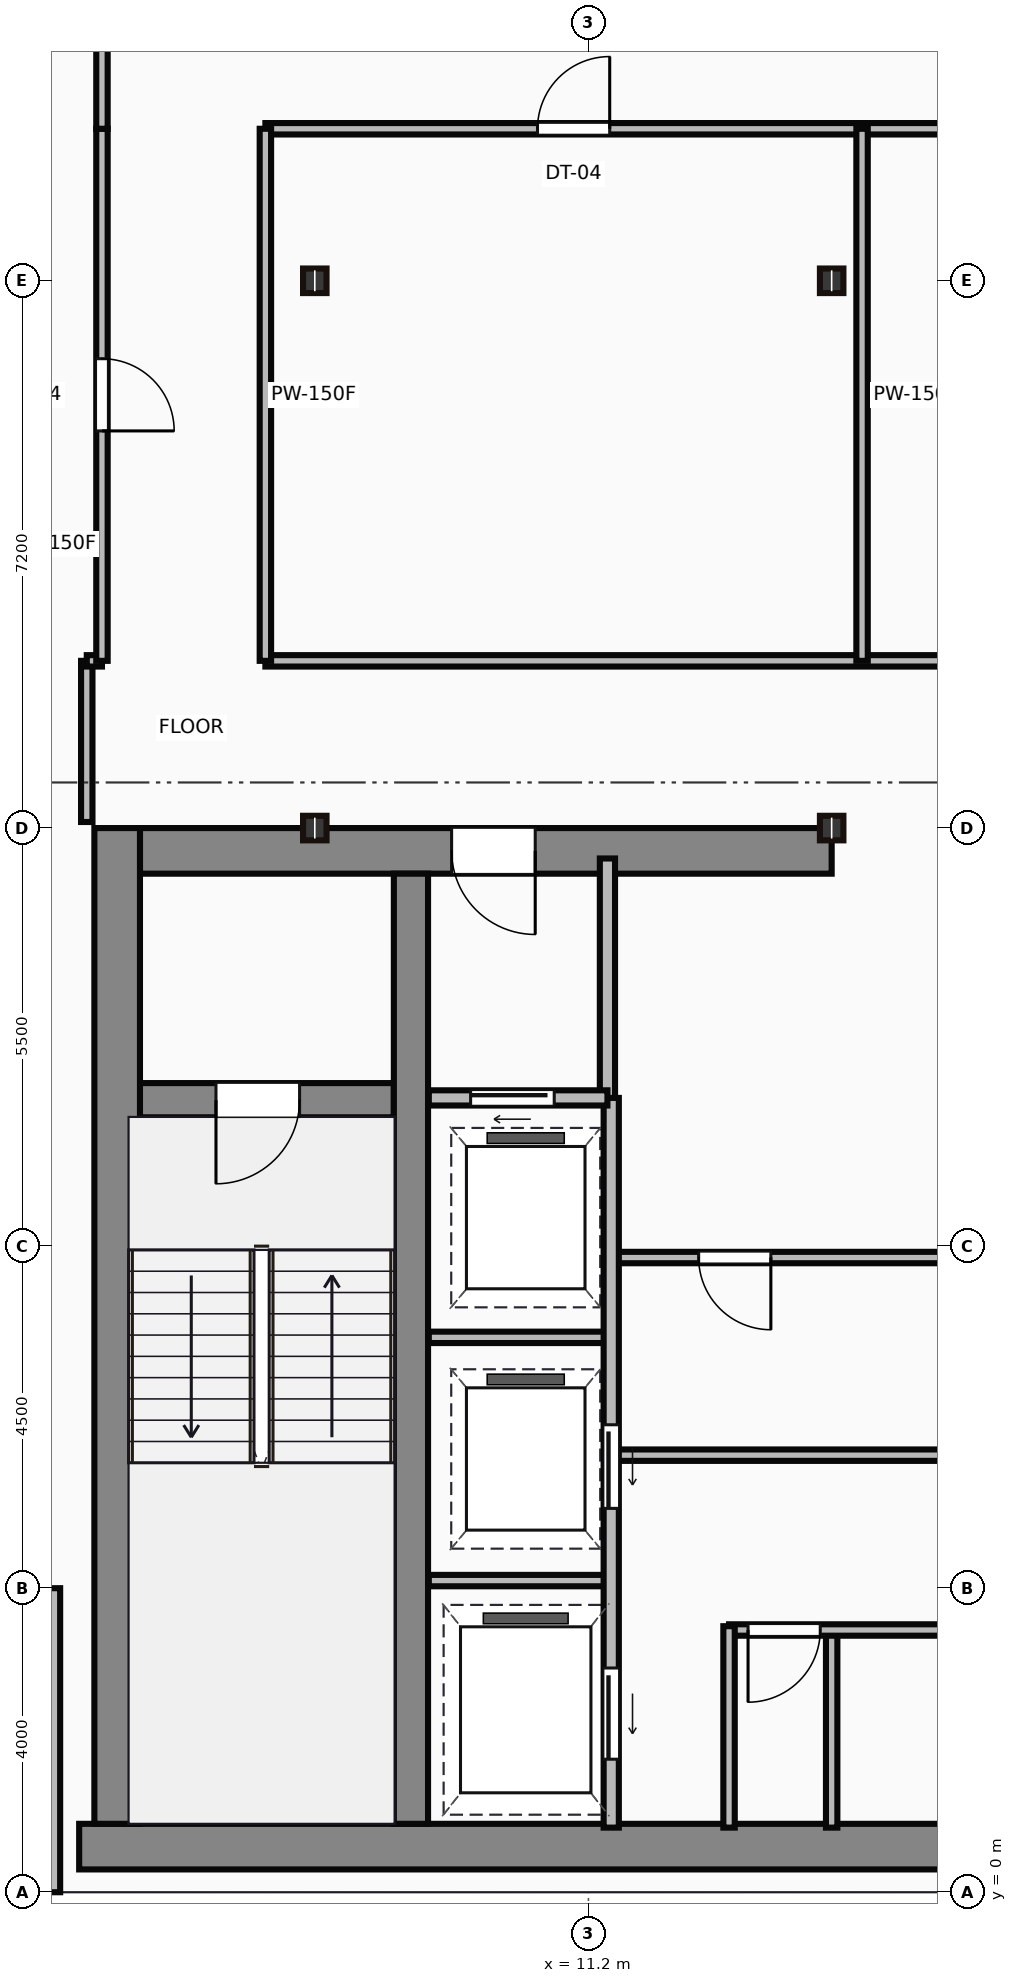
"""IFC4 building model, lengths in metres.
Left out: names, types, materials, properties, quantities, classifications, styles, units other than length and angle.
Written with IfcOpenShell. Run it as: python <this file> out.ifc"""

import sys

from ifc_helpers import new_model, si_unit, direction, frame, frame_2d, origin, origin_2d, place, context, subcontext, project, spatial, rectangle, i_section, extrude, source, transform, mapped, element, fill, save


model = new_model("IFC4")
c1 = context("Model", 3, precision=1e-05, world=origin(), true_north=direction((0.0, 1.0)))
c2 = subcontext(c1, "Body", "Model", "MODEL_VIEW")
j1 = project(units=[si_unit("LENGTHUNIT", "METRE"), si_unit("PLANEANGLEUNIT", "RADIAN")], contexts=[c1])
p1 = place(None, origin())
s1 = spatial("IfcSite", under=j1, at=p1, CompositionType="ELEMENT")
p2 = place(p1, origin())
s2 = spatial("IfcBuilding", under=s1, at=p2, CompositionType="ELEMENT")
p3 = place(p2, frame((0.0, 0.0, 273.4)))
s3 = spatial("IfcBuildingStorey", under=s2, at=p3, CompositionType="ELEMENT", Elevation=273.4)
m1 = source(origin(), c2, "Body", "SweptSolid", [
    extrude(rectangle(XDim=29.5, YDim=0.6, at=frame_2d((14.75, 0.0))), origin(), (0.0, 0.0, 1.0), 3.65),
])
p4 = place(p3, frame((4.5, 0.6, 0.0), z_axis=(0.0, 0.0, 1.0), x_axis=(1.0, 0.0, 0.0)))
e1 = element("IfcWall", 1, at=p4, inside=s3, PredefinedType="SHEAR", context=c2, shape_type="MappedRepresentation", body=[
    mapped(m1, transform((0.0, 0.0, 0.0))),
])
m2 = source(origin(), c2, "Body", "SweptSolid", [
    extrude(rectangle(XDim=13.1, YDim=0.6, at=frame_2d((6.55, 0.0))), origin(), (0.0, 0.0, 1.0), 3.65),
])
p5 = place(p3, frame((5.0, 0.9, 0.0), z_axis=(0.0, 0.0, 1.0), x_axis=(0.0, 1.0, 0.0)))
e2 = element("IfcWall", 2, at=p5, inside=s3, PredefinedType="SHEAR", context=c2, shape_type="MappedRepresentation", body=[
    mapped(m2, transform((0.0, 0.0, 0.0))),
])
m3 = source(origin(), c2, "Body", "SweptSolid", [
    extrude(rectangle(XDim=9.1, YDim=0.6, at=frame_2d((4.55, 0.0))), origin(), (0.0, 0.0, 1.0), 3.65),
])
p6 = place(p3, frame((5.3, 13.7, 0.0), z_axis=(0.0, 0.0, 1.0), x_axis=(1.0, 0.0, 0.0)))
e3 = element("IfcWall", 3, at=p6, inside=s3, PredefinedType="SHEAR", context=c2, shape_type="MappedRepresentation", body=[
    mapped(m3, transform((0.0, 0.0, 0.0))),
])
p7 = place(p6, frame((4.1, 0.0, 0.0)))
e4 = element("IfcOpeningElement", 4, at=p7, cuts=e3, PredefinedType="OPENING", context=c2, shape_type="SweptSolid", body=[
    extrude(rectangle(XDim=1.1, YDim=2.15, at=frame_2d((0.55, 1.075))), frame((0.0, 0.31, 0.0), z_axis=(0.0, -1.0, 0.0), x_axis=(1.0, 0.0, 0.0)), (0.0, 0.0, 1.0), 0.62),
])
m4 = source(origin(), c2, "Body", "SweptSolid", [
    extrude(rectangle(XDim=12.5, YDim=0.45, at=frame_2d((6.25, 0.0))), origin(), (0.0, 0.0, 1.0), 3.65),
])
p8 = place(p3, frame((8.865, 0.9, 0.0), z_axis=(0.0, 0.0, 1.0), x_axis=(0.0, 1.0, 0.0)))
e5 = element("IfcWall", 5, at=p8, inside=s3, PredefinedType="SHEAR", context=c2, shape_type="MappedRepresentation", body=[
    mapped(m4, transform((0.0, 0.0, 0.0))),
])
m5 = source(origin(), c2, "Body", "SweptSolid", [
    extrude(rectangle(XDim=3.39, YDim=0.45, at=frame_2d((1.695, 0.0))), origin(), (0.0, 0.0, 1.0), 3.65),
])
p9 = place(p3, frame((5.25, 10.42, 0.0), z_axis=(0.0, 0.0, 1.0), x_axis=(1.0, 0.0, 0.0)))
e6 = element("IfcWall", 6, at=p9, inside=s3, PredefinedType="SHEAR", context=c2, shape_type="MappedRepresentation", body=[
    mapped(m5, transform((0.0, 0.0, 0.0))),
])
p10 = place(p9, frame((1.05, 0.0, 0.0)))
e7 = element("IfcOpeningElement", 7, at=p10, cuts=e6, PredefinedType="OPENING", context=c2, shape_type="SweptSolid", body=[
    extrude(rectangle(XDim=1.1, YDim=2.15, at=frame_2d((0.55, 1.075))), frame((0.0, 0.235, 0.0), z_axis=(0.0, -1.0, 0.0), x_axis=(1.0, 0.0, 0.0)), (0.0, 0.0, 1.0), 0.47),
])
m6 = source(origin(), c2, "Body", "SweptSolid", [
    extrude(i_section(OverallWidth=0.309, OverallDepth=0.323, WebThickness=0.014, FlangeThickness=0.023, at=origin_2d()), origin(), (0.0, 0.0, 1.0), 3.65),
])
for number, where, z_axis, x_axis in (
    (8, (7.6, 14.0, 0.0), (0.0, 0.0, 1.0), (1.0, 0.0, 0.0)),
    (9, (7.6, 21.2, 0.0), (0.0, 0.0, 1.0), (1.0, 0.0, 0.0)),
    (10, (14.4, 14.0, 0.0), (0.0, 0.0, 1.0), (1.0, 0.0, 0.0)),
    (11, (14.4, 21.2, 0.0), (0.0, 0.0, 1.0), (1.0, 0.0, 0.0)),
):
    element("IfcColumn", number, at=place(p3, frame(where, z_axis=z_axis, x_axis=x_axis)), inside=s3, PredefinedType="COLUMN", context=c2, shape_type="MappedRepresentation", body=[
        mapped(m6, transform((0.0, 0.0, 0.0))),
    ])
m7 = source(origin(), c2, "Body", "SweptSolid", [
    extrude(rectangle(XDim=4.0, YDim=0.25, at=frame_2d((2.0, 0.0))), origin(), (0.0, 0.0, 1.0), 3.4),
])
p11 = place(p3, frame((4.125, 4.0, 0.0), z_axis=(0.0, 0.0, 1.0), x_axis=(0.0, -1.0, 0.0)))
e12 = element("IfcWall", 12, at=p11, inside=s3, PredefinedType="STANDARD", context=c2, shape_type="MappedRepresentation", body=[
    mapped(m7, transform((0.0, 0.0, 0.0))),
])
m8 = source(origin(), c2, "Body", "SweptSolid", [
    extrude(rectangle(XDim=3.18, YDim=0.2, at=frame_2d((1.59, 0.0))), origin(), (0.0, 0.0, 1.0), 3.4),
])
p12 = place(p3, frame((11.45, 10.42, 0.0), z_axis=(0.0, 0.0, 1.0), x_axis=(0.0, 1.0, 0.0)))
e13 = element("IfcWall", 13, at=p12, inside=s3, PredefinedType="PARTITIONING", context=c2, shape_type="MappedRepresentation", body=[
    mapped(m8, transform((0.0, 0.0, 0.0))),
])
m9 = source(origin(), c2, "Body", "SweptSolid", [
    extrude(rectangle(XDim=2.35, YDim=0.2, at=frame_2d((1.175, 0.0))), origin(), (0.0, 0.0, 1.0), 3.4),
])
p13 = place(p3, frame((9.1, 10.45, 0.0), z_axis=(0.0, 0.0, 1.0), x_axis=(1.0, 0.0, 0.0)))
e14 = element("IfcWall", 14, at=p13, inside=s3, PredefinedType="PARTITIONING", context=c2, shape_type="MappedRepresentation", body=[
    mapped(m9, transform((0.0, 0.0, 0.0))),
])
p14 = place(p13, frame((0.55, 0.0, 0.0)))
e15 = element("IfcOpeningElement", 15, at=p14, cuts=e14, PredefinedType="OPENING", context=c2, shape_type="SweptSolid", body=[
    extrude(rectangle(XDim=1.1, YDim=2.15, at=frame_2d((0.55, 1.075))), frame((0.0, 0.11, 0.0), z_axis=(0.0, -1.0, 0.0), x_axis=(1.0, 0.0, 0.0)), (0.0, 0.0, 1.0), 0.22),
])
m10 = source(origin(), c2, "Body", "SweptSolid", [
    extrude(rectangle(XDim=9.6, YDim=0.2, at=frame_2d((4.8, 0.0))), origin(), (0.0, 0.0, 1.0), 3.4),
])
p15 = place(p3, frame((11.5, 0.85, 0.0), z_axis=(0.0, 0.0, 1.0), x_axis=(0.0, 1.0, 0.0)))
e16 = element("IfcWall", 16, at=p15, inside=s3, PredefinedType="PARTITIONING", context=c2, shape_type="MappedRepresentation", body=[
    mapped(m10, transform((0.0, 0.0, 0.0))),
])
p16 = place(p15, frame((4.2, 0.0, 0.0)))
e17 = element("IfcOpeningElement", 17, at=p16, cuts=e16, PredefinedType="OPENING", context=c2, shape_type="SweptSolid", body=[
    extrude(rectangle(XDim=1.1, YDim=2.15, at=frame_2d((0.55, 1.075))), frame((0.0, 0.11, 0.0), z_axis=(0.0, -1.0, 0.0), x_axis=(1.0, 0.0, 0.0)), (0.0, 0.0, 1.0), 0.22),
])
p17 = place(p15, frame((0.9, 0.0, 0.0)))
e18 = element("IfcOpeningElement", 18, at=p17, cuts=e16, PredefinedType="OPENING", context=c2, shape_type="SweptSolid", body=[
    extrude(rectangle(XDim=1.2, YDim=2.15, at=frame_2d((0.6, 1.075))), frame((0.0, 0.11, 0.0), z_axis=(0.0, -1.0, 0.0), x_axis=(1.0, 0.0, 0.0)), (0.0, 0.0, 1.0), 0.22),
])
m11 = source(origin(), c2, "Body", "SweptSolid", [
    extrude(rectangle(XDim=2.4, YDim=0.15, at=frame_2d((1.2, 0.0))), origin(), (0.0, 0.0, 1.0), 3.4),
])
for number, where, z_axis, x_axis in (
    (19, (9.1, 4.1, 0.0), (0.0, 0.0, 1.0), (1.0, 0.0, 0.0)),
    (20, (9.1, 7.3, 0.0), (0.0, 0.0, 1.0), (1.0, 0.0, 0.0)),
):
    element("IfcWall", number, at=place(p3, frame(where, z_axis=z_axis, x_axis=x_axis)), inside=s3, PredefinedType="PARTITIONING", context=c2, shape_type="MappedRepresentation", body=[
        mapped(m11, transform((0.0, 0.0, 0.0))),
    ])
m12 = source(origin(), c2, "Body", "SweptSolid", [
    extrude(rectangle(XDim=2.65, YDim=0.15, at=frame_2d((1.325, 0.0))), origin(), (0.0, 0.0, 1.0), 3.4),
])
p18 = place(p3, frame((13.05, 0.85, 0.0), z_axis=(0.0, 0.0, 1.0), x_axis=(0.0, 1.0, 0.0)))
e21 = element("IfcWall", 21, at=p18, inside=s3, PredefinedType="PARTITIONING", context=c2, shape_type="MappedRepresentation", body=[
    mapped(m12, transform((0.0, 0.0, 0.0))),
])
m13 = source(origin(), c2, "Body", "SweptSolid", [
    extrude(rectangle(XDim=10.35, YDim=0.15, at=frame_2d((5.175, 0.0))), origin(), (0.0, 0.0, 1.0), 3.4),
])
p19 = place(p3, frame((13.05, 3.45, 0.0), z_axis=(0.0, 0.0, 1.0), x_axis=(1.0, 0.0, 0.0)))
e22 = element("IfcWall", 22, at=p19, inside=s3, PredefinedType="PARTITIONING", context=c2, shape_type="MappedRepresentation", body=[
    mapped(m13, transform((0.0, 0.0, 0.0))),
])
p20 = place(p19, frame((0.25, 0.0, 0.0)))
e23 = element("IfcOpeningElement", 23, at=p20, cuts=e22, PredefinedType="OPENING", context=c2, shape_type="SweptSolid", body=[
    extrude(rectangle(XDim=0.95, YDim=2.15, at=frame_2d((0.475, 1.075))), frame((0.0, 0.085, 0.0), z_axis=(0.0, -1.0, 0.0), x_axis=(1.0, 0.0, 0.0)), (0.0, 0.0, 1.0), 0.17),
])
p21 = place(p19, frame((6.8, 0.0, 0.0)))
e24 = element("IfcOpeningElement", 24, at=p21, cuts=e22, PredefinedType="OPENING", context=c2, shape_type="SweptSolid", body=[
    extrude(rectangle(XDim=0.95, YDim=2.15, at=frame_2d((0.475, 1.075))), frame((0.0, 0.085, 0.0), z_axis=(0.0, -1.0, 0.0), x_axis=(1.0, 0.0, 0.0)), (0.0, 0.0, 1.0), 0.17),
])
m14 = source(origin(), c2, "Body", "SweptSolid", [
    extrude(rectangle(XDim=2.6, YDim=0.15, at=frame_2d((1.3, 0.0))), origin(), (0.0, 0.0, 1.0), 3.4),
])
p22 = place(p3, frame((14.4, 0.85, 0.0), z_axis=(0.0, 0.0, 1.0), x_axis=(0.0, 1.0, 0.0)))
e25 = element("IfcWall", 25, at=p22, inside=s3, PredefinedType="PARTITIONING", context=c2, shape_type="MappedRepresentation", body=[
    mapped(m14, transform((0.0, 0.0, 0.0))),
])
m15 = source(origin(), c2, "Body", "SweptSolid", [
    extrude(rectangle(XDim=11.85, YDim=0.15, at=frame_2d((5.925, 0.0))), origin(), (0.0, 0.0, 1.0), 3.4),
])
p23 = place(p3, frame((11.55, 5.75, 0.0), z_axis=(0.0, 0.0, 1.0), x_axis=(1.0, 0.0, 0.0)))
e26 = element("IfcWall", 26, at=p23, inside=s3, PredefinedType="PARTITIONING", context=c2, shape_type="MappedRepresentation", body=[
    mapped(m15, transform((0.0, 0.0, 0.0))),
])
p24 = place(p3, frame((11.55, 8.35, 0.0), z_axis=(0.0, 0.0, 1.0), x_axis=(1.0, 0.0, 0.0)))
e27 = element("IfcWall", 27, at=p24, inside=s3, PredefinedType="PARTITIONING", context=c2, shape_type="MappedRepresentation", body=[
    mapped(m15, transform((0.0, 0.0, 0.0))),
])
p25 = place(p24, frame((1.1, 0.0, 0.0)))
e28 = element("IfcOpeningElement", 28, at=p25, cuts=e27, PredefinedType="OPENING", context=c2, shape_type="SweptSolid", body=[
    extrude(rectangle(XDim=0.95, YDim=2.15, at=frame_2d((0.475, 1.075))), frame((0.0, 0.085, 0.0), z_axis=(0.0, -1.0, 0.0), x_axis=(1.0, 0.0, 0.0)), (0.0, 0.0, 1.0), 0.17),
])
p26 = place(p24, frame((9.4, 0.0, 0.0)))
e29 = element("IfcOpeningElement", 29, at=p26, cuts=e27, PredefinedType="OPENING", context=c2, shape_type="SweptSolid", body=[
    extrude(rectangle(XDim=0.95, YDim=2.15, at=frame_2d((0.475, 1.075))), frame((0.0, 0.085, 0.0), z_axis=(0.0, -1.0, 0.0), x_axis=(1.0, 0.0, 0.0)), (0.0, 0.0, 1.0), 0.17),
])
m16 = source(origin(), c2, "Body", "SweptSolid", [
    extrude(rectangle(XDim=2.12, YDim=0.15, at=frame_2d((1.06, 0.0))), origin(), (0.0, 0.0, 1.0), 3.4),
])
p27 = place(p3, frame((4.6, 14.08, 0.0), z_axis=(0.0, 0.0, 1.0), x_axis=(0.0, 1.0, 0.0)))
e30 = element("IfcWall", 30, at=p27, inside=s3, PredefinedType="PARTITIONING", context=c2, shape_type="MappedRepresentation", body=[
    mapped(m16, transform((0.0, 0.0, 0.0))),
])
m17 = source(origin(), c2, "Body", "SweptSolid", [
    extrude(rectangle(XDim=0.2, YDim=0.15, at=frame_2d((0.1, 0.0))), origin(), (0.0, 0.0, 1.0), 3.4),
])
p28 = place(p3, frame((4.6, 16.2, 0.0), z_axis=(0.0, 0.0, 1.0), x_axis=(1.0, 0.0, 0.0)))
e31 = element("IfcWall", 31, at=p28, inside=s3, PredefinedType="PARTITIONING", context=c2, shape_type="MappedRepresentation", body=[
    mapped(m17, transform((0.0, 0.0, 0.0))),
])
m18 = source(origin(), c2, "Body", "SweptSolid", [
    extrude(rectangle(XDim=7.0, YDim=0.15, at=frame_2d((3.5, 0.0))), origin(), (0.0, 0.0, 1.0), 3.4),
])
p29 = place(p3, frame((4.8, 16.2, 0.0), z_axis=(0.0, 0.0, 1.0), x_axis=(0.0, 1.0, 0.0)))
e32 = element("IfcWall", 32, at=p29, inside=s3, PredefinedType="PARTITIONING", context=c2, shape_type="MappedRepresentation", body=[
    mapped(m18, transform((0.0, 0.0, 0.0))),
])
p30 = place(p29, frame((3.025, 0.0, 0.0)))
e33 = element("IfcOpeningElement", 33, at=p30, cuts=e32, PredefinedType="OPENING", context=c2, shape_type="SweptSolid", body=[
    extrude(rectangle(XDim=0.95, YDim=2.15, at=frame_2d((0.475, 1.075))), frame((0.0, 0.085, 0.0), z_axis=(0.0, -1.0, 0.0), x_axis=(1.0, 0.0, 0.0)), (0.0, 0.0, 1.0), 0.17),
])
m19 = source(origin(), c2, "Body", "SweptSolid", [
    extrude(rectangle(XDim=2.0, YDim=0.15, at=frame_2d((1.0, 0.0))), origin(), (0.0, 0.0, 1.0), 3.4),
])
p31 = place(p3, frame((4.8, 23.2, 0.0), z_axis=(0.0, 0.0, 1.0), x_axis=(0.0, 1.0, 0.0)))
e34 = element("IfcWall", 34, at=p31, inside=s3, PredefinedType="PARTITIONING", context=c2, shape_type="MappedRepresentation", body=[
    mapped(m19, transform((0.0, 0.0, 0.0))),
])
m20 = source(origin(), c2, "Body", "SweptSolid", [
    extrude(rectangle(XDim=28.65, YDim=0.15, at=frame_2d((14.325, 0.0))), origin(), (0.0, 0.0, 1.0), 3.4),
])
p32 = place(p3, frame((6.95, 16.2, 0.0), z_axis=(0.0, 0.0, 1.0), x_axis=(1.0, 0.0, 0.0)))
e35 = element("IfcWall", 35, at=p32, inside=s3, PredefinedType="PARTITIONING", context=c2, shape_type="MappedRepresentation", body=[
    mapped(m20, transform((0.0, 0.0, 0.0))),
])
p33 = place(p32, frame((21.445, 0.0, 0.0)))
e36 = element("IfcOpeningElement", 36, at=p33, cuts=e35, PredefinedType="OPENING", context=c2, shape_type="SweptSolid", body=[
    extrude(rectangle(XDim=0.95, YDim=2.15, at=frame_2d((0.475, 1.075))), frame((0.0, 0.085, 0.0), z_axis=(0.0, -1.0, 0.0), x_axis=(1.0, 0.0, 0.0)), (0.0, 0.0, 1.0), 0.17),
])
p34 = place(p3, frame((35.6, 23.2, 0.0), z_axis=(0.0, 0.0, 1.0), x_axis=(-1.0, 0.0, 0.0)))
e37 = element("IfcWall", 37, at=p34, inside=s3, PredefinedType="PARTITIONING", context=c2, shape_type="MappedRepresentation", body=[
    mapped(m20, transform((0.0, 0.0, 0.0))),
])
p35 = place(p34, frame((24.12, 0.0, 0.0)))
e38 = element("IfcOpeningElement", 38, at=p35, cuts=e37, PredefinedType="OPENING", context=c2, shape_type="SweptSolid", body=[
    extrude(rectangle(XDim=0.95, YDim=2.15, at=frame_2d((0.475, 1.075))), frame((0.0, 0.085, 0.0), z_axis=(0.0, -1.0, 0.0), x_axis=(1.0, 0.0, 0.0)), (0.0, 0.0, 1.0), 0.17),
])
p36 = place(p34, frame((16.525, 0.0, 0.0)))
e39 = element("IfcOpeningElement", 39, at=p36, cuts=e37, PredefinedType="OPENING", context=c2, shape_type="SweptSolid", body=[
    extrude(rectangle(XDim=0.95, YDim=2.15, at=frame_2d((0.475, 1.075))), frame((0.0, 0.085, 0.0), z_axis=(0.0, -1.0, 0.0), x_axis=(1.0, 0.0, 0.0)), (0.0, 0.0, 1.0), 0.17),
])
for number, where, z_axis, x_axis in (
    (40, (6.95, 23.2, 0.0), (0.0, 0.0, 1.0), (0.0, -1.0, 0.0)),
    (41, (14.8, 23.2, 0.0), (0.0, 0.0, 1.0), (0.0, -1.0, 0.0)),
):
    element("IfcWall", number, at=place(p3, frame(where, z_axis=z_axis, x_axis=x_axis)), inside=s3, PredefinedType="PARTITIONING", context=c2, shape_type="MappedRepresentation", body=[
        mapped(m18, transform((0.0, 0.0, 0.0))),
    ])
m21 = source(origin(), c2, "Body", "SweptSolid", [
    extrude(rectangle(XDim=1.1, YDim=2.15, at=frame_2d((0.55, 1.075))), frame((0.0, 0.025, 0.0), z_axis=(0.0, -1.0, 0.0), x_axis=(1.0, 0.0, 0.0)), (0.0, 0.0, 1.0), 0.05),
])
p37 = place(p10, frame((1.1, 0.0, 0.0), z_axis=(0.0, 0.0, 1.0), x_axis=(-1.0, 0.0, 0.0)))
e42 = element("IfcDoor", 42, at=p37, inside=s3, OperationType="SINGLE_SWING_LEFT", PredefinedType="DOOR", context=c2, shape_type="MappedRepresentation", body=[
    mapped(m21, transform((0.0, 0.0, 0.0))),
])
fill(e7, e42)
p38 = place(p7, origin())
e43 = element("IfcDoor", 43, at=p38, inside=s3, OperationType="SINGLE_SWING_RIGHT", PredefinedType="DOOR", context=c2, shape_type="MappedRepresentation", body=[
    mapped(m21, transform((0.0, 0.0, 0.0))),
])
fill(e4, e43)
p39 = place(p14, origin())
e44 = element("IfcDoor", 44, at=p39, inside=s3, OperationType="SLIDING_TO_LEFT", PredefinedType="DOOR", context=c2, shape_type="MappedRepresentation", body=[
    mapped(m21, transform((0.0, 0.0, 0.0))),
])
fill(e15, e44)
p40 = place(p16, frame((1.1, 0.0, 0.0), z_axis=(0.0, 0.0, 1.0), x_axis=(-1.0, 0.0, 0.0)))
e45 = element("IfcDoor", 45, at=p40, inside=s3, OperationType="SLIDING_TO_LEFT", PredefinedType="DOOR", context=c2, shape_type="MappedRepresentation", body=[
    mapped(m21, transform((0.0, 0.0, 0.0))),
])
fill(e17, e45)
m22 = source(origin(), c2, "Body", "SweptSolid", [
    extrude(rectangle(XDim=1.2, YDim=2.15, at=frame_2d((0.6, 1.075))), frame((0.0, 0.025, 0.0), z_axis=(0.0, -1.0, 0.0), x_axis=(1.0, 0.0, 0.0)), (0.0, 0.0, 1.0), 0.05),
])
p41 = place(p17, frame((1.2, 0.0, 0.0), z_axis=(0.0, 0.0, 1.0), x_axis=(-1.0, 0.0, 0.0)))
e46 = element("IfcDoor", 46, at=p41, inside=s3, OperationType="SLIDING_TO_LEFT", PredefinedType="DOOR", context=c2, shape_type="MappedRepresentation", body=[
    mapped(m22, transform((0.0, 0.0, 0.0))),
])
fill(e18, e46)
m23 = source(origin(), c2, "Body", "SweptSolid", [
    extrude(rectangle(XDim=0.95, YDim=2.15, at=frame_2d((0.475, 1.075))), frame((0.0, 0.025, 0.0), z_axis=(0.0, -1.0, 0.0), x_axis=(1.0, 0.0, 0.0)), (0.0, 0.0, 1.0), 0.05),
])
p42 = place(p20, origin())
e47 = element("IfcDoor", 47, at=p42, inside=s3, OperationType="SINGLE_SWING_LEFT", PredefinedType="DOOR", context=c2, shape_type="MappedRepresentation", body=[
    mapped(m23, transform((0.0, 0.0, 0.0))),
])
fill(e23, e47)
p43 = place(p25, origin())
e48 = element("IfcDoor", 48, at=p43, inside=s3, OperationType="SINGLE_SWING_RIGHT", PredefinedType="DOOR", context=c2, shape_type="MappedRepresentation", body=[
    mapped(m23, transform((0.0, 0.0, 0.0))),
])
fill(e28, e48)
p44 = place(p30, origin())
e49 = element("IfcDoor", 49, at=p44, inside=s3, OperationType="SINGLE_SWING_LEFT", PredefinedType="DOOR", context=c2, shape_type="MappedRepresentation", body=[
    mapped(m23, transform((0.0, 0.0, 0.0))),
])
fill(e33, e49)
p45 = place(p35, origin())
e50 = element("IfcDoor", 50, at=p45, inside=s3, OperationType="SINGLE_SWING_LEFT", PredefinedType="DOOR", context=c2, shape_type="MappedRepresentation", body=[
    mapped(m23, transform((0.0, 0.0, 0.0))),
])
fill(e38, e50)
save(model, sys.argv[1])
